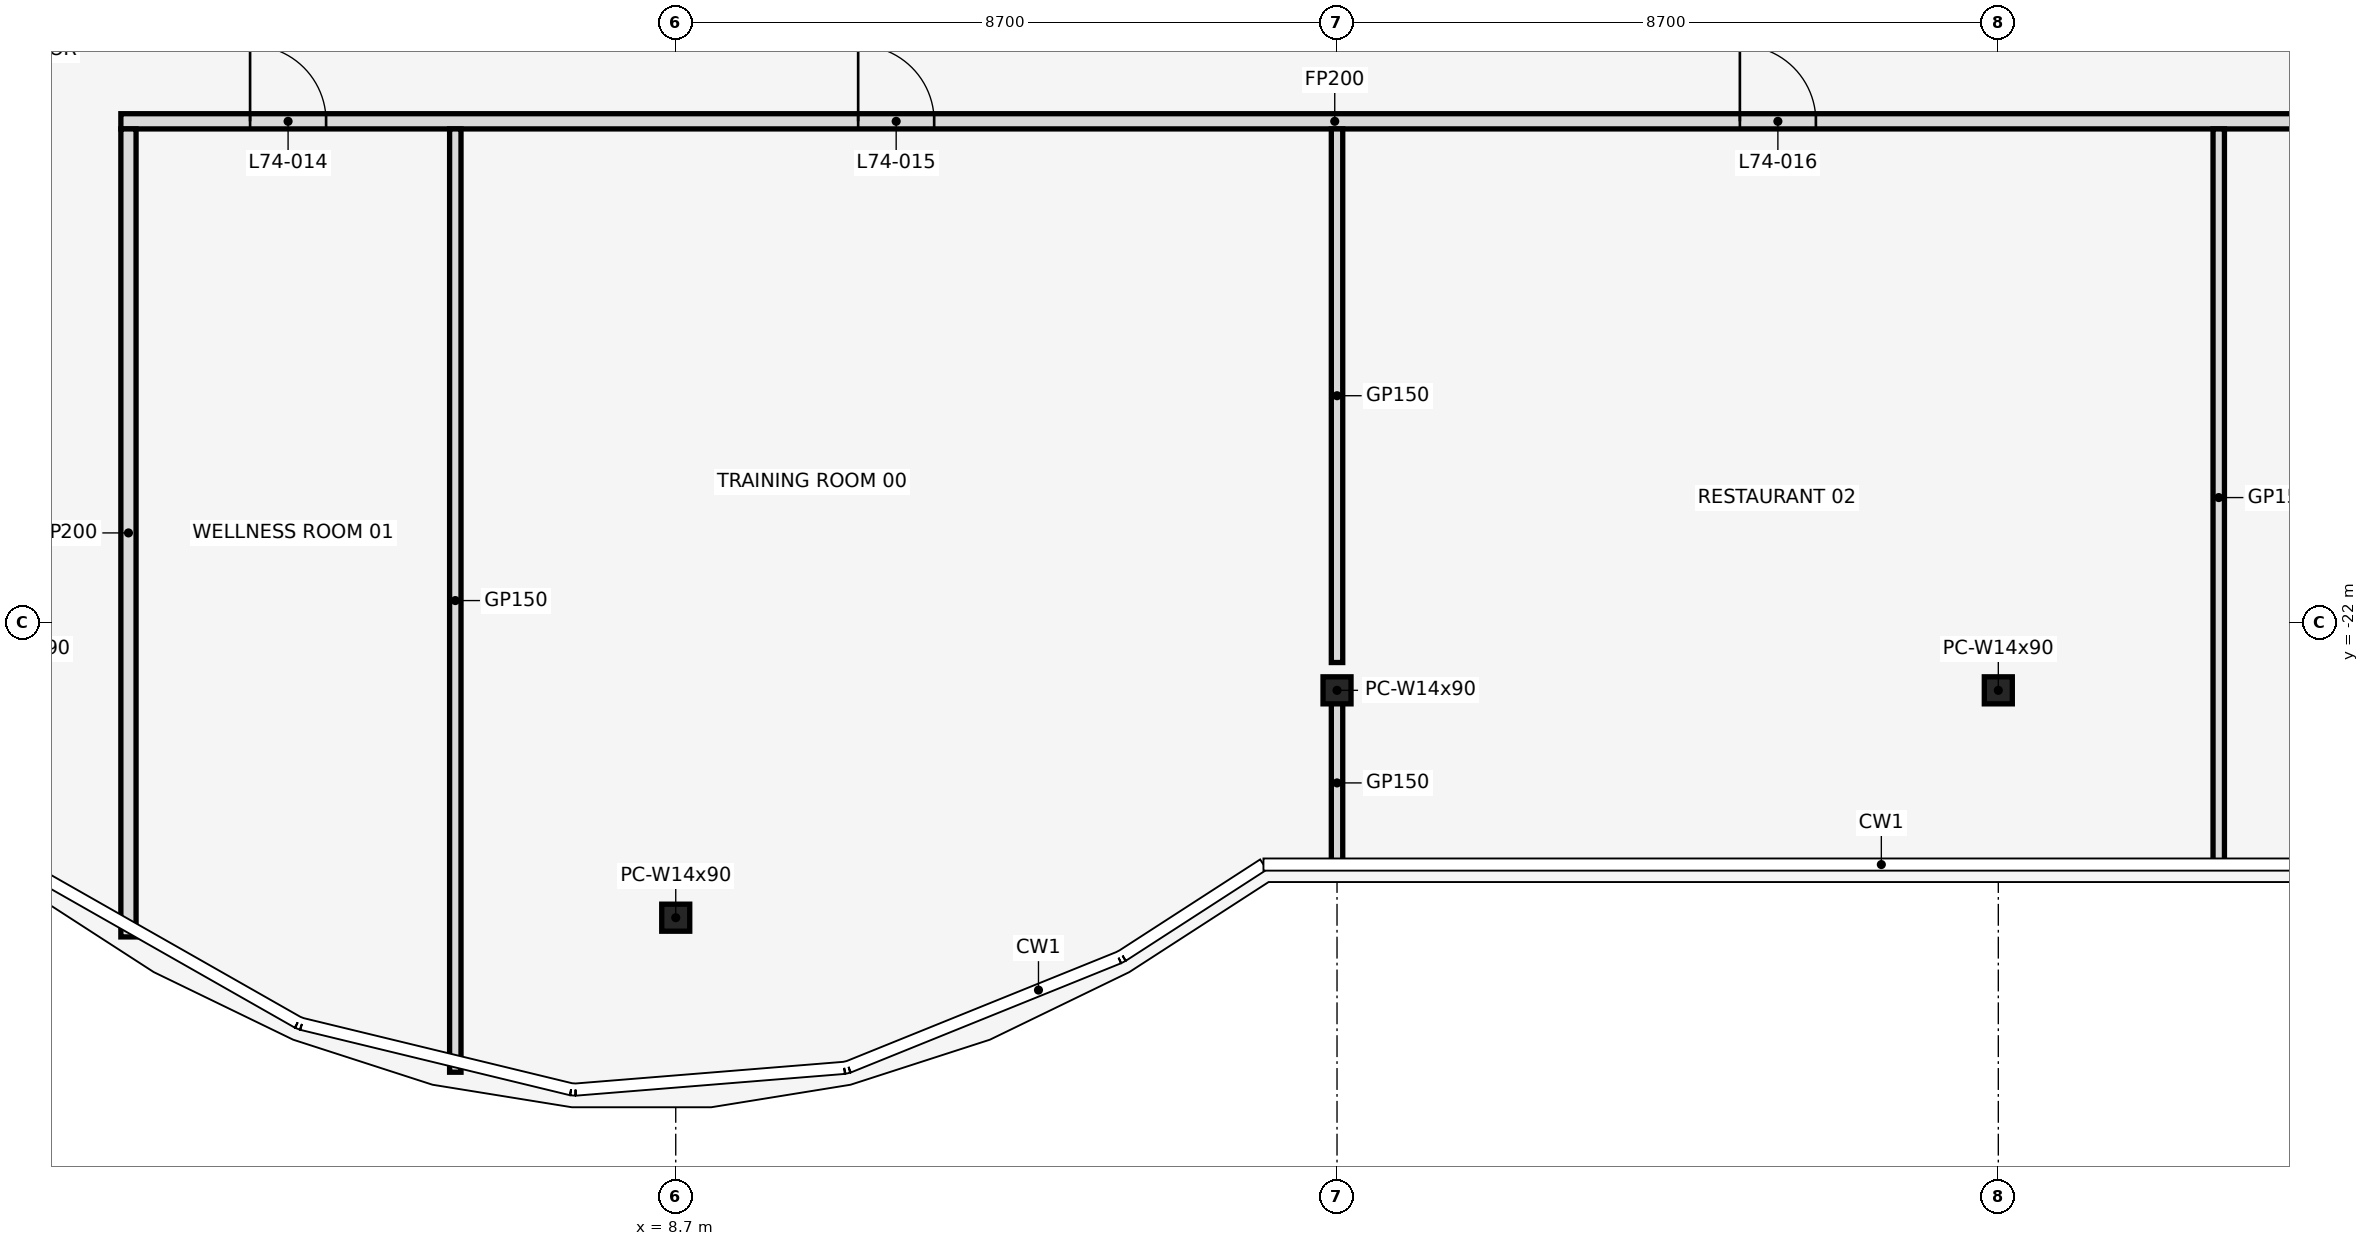
"""IFC4 building model, lengths in metres.
Left out: names, types, materials, properties, quantities, classifications, styles, units other than length and angle.
Written with IfcOpenShell. Run it as: python <this file> out.ifc"""

import sys

from ifc_helpers import new_model, si_unit, direction, frame, frame_2d, origin, origin_2d, place, context, subcontext, project, spatial, rectangle, i_section, extrude, element, fill, save


model = new_model("IFC4")
c1 = context("Model", 3, precision=1e-05, world=origin(), true_north=direction((0.0, 1.0)))
c2 = subcontext(c1, "Body", "Model", "MODEL_VIEW")
j1 = project(units=[si_unit("LENGTHUNIT", "METRE"), si_unit("PLANEANGLEUNIT", "RADIAN")], contexts=[c1])
p1 = place(None, origin())
s1 = spatial("IfcSite", under=j1, at=p1, CompositionType="ELEMENT")
p2 = place(p1, origin())
s2 = spatial("IfcBuilding", under=s1, at=p2, CompositionType="ELEMENT")
p3 = place(p2, frame((0.0, 0.0, 329.0)))
s3 = spatial("IfcBuildingStorey", under=s2, at=p3, CompositionType="ELEMENT", Elevation=329.0)
for number, where, z_axis, x_axis in (
    (1, (8.7, -25.877, 0.0), (0.0, 0.0, 1.0), (1.0, 0.0, 0.0)),
    (2, (17.4, -22.886, 0.0), (0.0, 0.0, 1.0), (1.0, 0.0, 0.0)),
    (3, (26.1, -22.886, 0.0), (0.0, 0.0, 1.0), (1.0, 0.0, 0.0)),
):
    element("IfcColumn", number, at=place(p3, frame(where, z_axis=z_axis, x_axis=x_axis)), inside=s3, PredefinedType="COLUMN", context=c2, shape_type="SweptSolid", body=[
        extrude(i_section(OverallWidth=0.368, OverallDepth=0.356, WebThickness=0.011, FlangeThickness=0.018, at=origin_2d()), origin(), (0.0, 0.0, 1.0), 4.5),
    ])
p4 = place(p3, frame((1.4, -15.4, 0.0), z_axis=(0.0, 0.0, 1.0), x_axis=(1.0, 0.0, 0.0)))
e4 = element("IfcWall", 4, at=p4, inside=s3, PredefinedType="PARTITIONING", context=c2, shape_type="SweptSolid", body=[
    extrude(rectangle(XDim=31.94, YDim=0.2, at=frame_2d((15.97, 0.0))), origin(), (0.0, 0.0, 1.0), 3.418),
])
p5 = place(p4, frame((1.7, 0.0, 0.0)))
e5 = element("IfcOpeningElement", 5, at=p5, cuts=e4, PredefinedType="OPENING", context=c2, shape_type="SweptSolid", body=[
    extrude(rectangle(XDim=1.0, YDim=2.1, at=frame_2d((0.5, 1.05))), frame((0.0, 0.112, 0.0), z_axis=(0.0, -1.0, 0.0), x_axis=(1.0, 0.0, 0.0)), (0.0, 0.0, 1.0), 0.224),
])
p6 = place(p4, frame((9.7, 0.0, 0.0)))
e6 = element("IfcOpeningElement", 6, at=p6, cuts=e4, PredefinedType="OPENING", context=c2, shape_type="SweptSolid", body=[
    extrude(rectangle(XDim=1.0, YDim=2.1, at=frame_2d((0.5, 1.05))), frame((0.0, 0.112, 0.0), z_axis=(0.0, -1.0, 0.0), x_axis=(1.0, 0.0, 0.0)), (0.0, 0.0, 1.0), 0.224),
])
p7 = place(p4, frame((21.3, 0.0, 0.0)))
e7 = element("IfcOpeningElement", 7, at=p7, cuts=e4, PredefinedType="OPENING", context=c2, shape_type="SweptSolid", body=[
    extrude(rectangle(XDim=1.0, YDim=2.1, at=frame_2d((0.5, 1.05))), frame((0.0, 0.112, 0.0), z_axis=(0.0, -1.0, 0.0), x_axis=(1.0, 0.0, 0.0)), (0.0, 0.0, 1.0), 0.224),
])
p8 = place(p4, frame((29.3, 0.0, 0.0)))
e8 = element("IfcOpeningElement", 8, at=p8, cuts=e4, PredefinedType="OPENING", context=c2, shape_type="SweptSolid", body=[
    extrude(rectangle(XDim=1.0, YDim=2.1, at=frame_2d((0.5, 1.05))), frame((0.0, 0.112, 0.0), z_axis=(0.0, -1.0, 0.0), x_axis=(1.0, 0.0, 0.0)), (0.0, 0.0, 1.0), 0.224),
])
p9 = place(p3, frame((1.5, -26.13, 0.0), z_axis=(0.0, 0.0, 1.0), x_axis=(0.0, 1.0, 0.0)))
e9 = element("IfcWall", 9, at=p9, inside=s3, PredefinedType="PARTITIONING", context=c2, shape_type="SweptSolid", body=[
    extrude(rectangle(XDim=10.63, YDim=0.2, at=frame_2d((5.315, 0.0))), origin(), (0.0, 0.0, 1.0), 3.418),
])
p10 = place(p3, frame((5.8, -27.91, 0.0), z_axis=(0.0, 0.0, 1.0), x_axis=(0.0, 1.0, 0.0)))
e10 = element("IfcWall", 10, at=p10, inside=s3, PredefinedType="PARTITIONING", context=c2, shape_type="SweptSolid", body=[
    extrude(rectangle(XDim=12.41, YDim=0.15, at=frame_2d((6.205, 0.0))), origin(), (0.0, 0.0, 1.0), 3.418),
])
p11 = place(p3, frame((17.4, -25.2, 0.0), z_axis=(0.0, 0.0, 1.0), x_axis=(0.0, 1.0, 0.0)))
e11 = element("IfcWall", 11, at=p11, inside=s3, PredefinedType="PARTITIONING", context=c2, shape_type="SweptSolid", body=[
    extrude(rectangle(XDim=2.192, YDim=0.15, at=frame_2d((1.096, 0.0))), origin(), (0.0, 0.0, 1.0), 3.418),
])
p12 = place(p3, frame((17.4, -22.52, 0.0), z_axis=(0.0, 0.0, 1.0), x_axis=(0.0, 1.0, 0.0)))
e12 = element("IfcWall", 12, at=p12, inside=s3, PredefinedType="PARTITIONING", context=c2, shape_type="SweptSolid", body=[
    extrude(rectangle(XDim=7.02, YDim=0.15, at=frame_2d((3.51, 0.0))), origin(), (0.0, 0.0, 1.0), 3.418),
])
p13 = place(p3, frame((29.0, -25.2, 0.0), z_axis=(0.0, 0.0, 1.0), x_axis=(0.0, 1.0, 0.0)))
e13 = element("IfcWall", 13, at=p13, inside=s3, PredefinedType="PARTITIONING", context=c2, shape_type="SweptSolid", body=[
    extrude(rectangle(XDim=9.7, YDim=0.15, at=frame_2d((4.85, 0.0))), origin(), (0.0, 0.0, 1.0), 3.418),
])
p14 = place(p5, frame((1.0, 0.0, 0.0), z_axis=(0.0, 0.0, 1.0), x_axis=(-1.0, 0.0, 0.0)))
e14 = element("IfcDoor", 14, at=p14, inside=s3, OperationType="SINGLE_SWING_RIGHT", PredefinedType="DOOR", context=c2, shape_type="SweptSolid", body=[
    extrude(rectangle(XDim=1.0, YDim=2.1, at=frame_2d((0.5, 1.05))), frame((0.0, 0.025, 0.0), z_axis=(0.0, -1.0, 0.0), x_axis=(1.0, 0.0, 0.0)), (0.0, 0.0, 1.0), 0.05),
])
fill(e5, e14)
p15 = place(p6, frame((1.0, 0.0, 0.0), z_axis=(0.0, 0.0, 1.0), x_axis=(-1.0, 0.0, 0.0)))
e15 = element("IfcDoor", 15, at=p15, inside=s3, OperationType="SINGLE_SWING_RIGHT", PredefinedType="DOOR", context=c2, shape_type="SweptSolid", body=[
    extrude(rectangle(XDim=1.0, YDim=2.1, at=frame_2d((0.5, 1.05))), frame((0.0, 0.025, 0.0), z_axis=(0.0, -1.0, 0.0), x_axis=(1.0, 0.0, 0.0)), (0.0, 0.0, 1.0), 0.05),
])
fill(e6, e15)
p16 = place(p7, frame((1.0, 0.0, 0.0), z_axis=(0.0, 0.0, 1.0), x_axis=(-1.0, 0.0, 0.0)))
e16 = element("IfcDoor", 16, at=p16, inside=s3, OperationType="SINGLE_SWING_LEFT", PredefinedType="DOOR", context=c2, shape_type="SweptSolid", body=[
    extrude(rectangle(XDim=1.0, YDim=2.1, at=frame_2d((0.5, 1.05))), frame((0.0, 0.025, 0.0), z_axis=(0.0, -1.0, 0.0), x_axis=(1.0, 0.0, 0.0)), (0.0, 0.0, 1.0), 0.05),
])
fill(e7, e16)
save(model, sys.argv[1])
